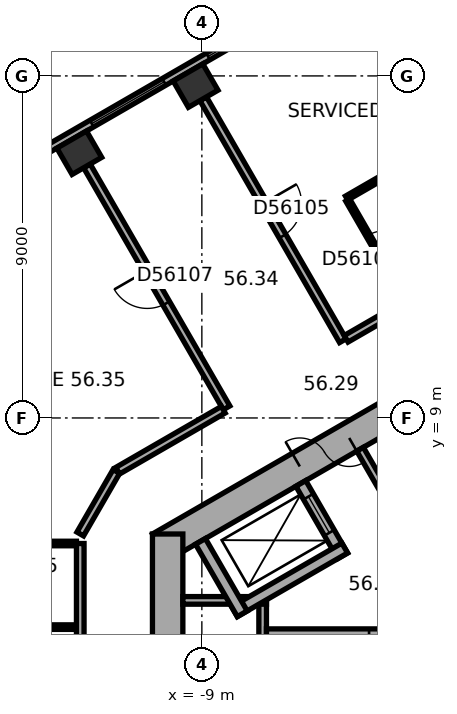
"""IFC4 building model, lengths in metres.
Left out: names, types, materials, properties, quantities, classifications, styles, units other than length and angle.
Written with IfcOpenShell. Run it as: python <this file> out.ifc"""

import sys

from ifc_helpers import new_model, si_unit, direction, frame, frame_2d, origin, origin_2d, place, context, subcontext, project, spatial, rectangle, extrude, element, fill, save


model = new_model("IFC4")
c1 = context("Model", 3, precision=1e-05, world=origin(), true_north=direction((0.0, 1.0)))
c2 = subcontext(c1, "Body", "Model", "MODEL_VIEW")
j1 = project(units=[si_unit("LENGTHUNIT", "METRE"), si_unit("PLANEANGLEUNIT", "RADIAN")], contexts=[c1])
p1 = place(None, origin())
s1 = spatial("IfcSite", under=j1, at=p1, CompositionType="ELEMENT")
p2 = place(p1, origin())
s2 = spatial("IfcBuilding", under=s1, at=p2, CompositionType="ELEMENT")
p3 = place(p2, frame((0.0, 0.0, 229.1)))
s3 = spatial("IfcBuildingStorey", under=s2, at=p3, CompositionType="ELEMENT", Elevation=229.1)
for number, where, z_axis, x_axis in (
    (1, (-9.165, 17.745, 0.0), (0.0, 0.0, 1.0), (-0.866, -0.5, 0.0)),
    (2, (-12.225, 15.978, 0.0), (0.0, 0.0, 1.0), (-0.866, -0.5, 0.0)),
):
    element("IfcColumn", number, at=place(p3, frame(where, z_axis=z_axis, x_axis=x_axis)), inside=s3, PredefinedType="COLUMN", context=c2, shape_type="SweptSolid", body=[
        extrude(rectangle(XDim=0.9, YDim=0.8, at=origin_2d()), origin(), (0.0, 0.0, 1.0), 3.7),
    ])
p4 = place(p3, frame((0.2, 11.547, 0.0), z_axis=(0.0, 0.0, 1.0), x_axis=(-0.866023897231, -0.500002609418, 0.0)))
e3 = element("IfcWall", 3, at=p4, inside=s3, PredefinedType="SHEAR", context=c2, shape_type="SweptSolid", body=[
    extrude(rectangle(XDim=11.894, YDim=0.8, at=frame_2d((5.947, 0.0))), origin(), (0.0, 0.0, 1.0), 3.7),
])
p5 = place(p4, frame((6.147, 0.0, 0.0)))
e4 = element("IfcOpeningElement", 4, at=p5, cuts=e3, PredefinedType="OPENING", context=c2, shape_type="SweptSolid", body=[
    extrude(rectangle(XDim=1.5, YDim=2.1, at=frame_2d((0.75, 1.05))), frame((0.0, 0.41, 0.0), z_axis=(0.0, -1.0, 0.0), x_axis=(1.0, 0.0, 0.0)), (0.0, 0.0, 1.0), 0.82),
])
p6 = place(p4, frame((2.997, 0.0, 0.0)))
e5 = element("IfcOpeningElement", 5, at=p6, cuts=e3, PredefinedType="OPENING", context=c2, shape_type="SweptSolid", body=[
    extrude(rectangle(XDim=0.9, YDim=2.1, at=frame_2d((0.45, 1.05))), frame((0.0, 0.41, 0.0), z_axis=(0.0, -1.0, 0.0), x_axis=(1.0, 0.0, 0.0)), (0.0, 0.0, 1.0), 0.82),
])
p7 = place(p3, frame((-9.9, 5.947, 0.0), z_axis=(0.0, 0.0, 1.0), x_axis=(0.0, -1.0, 0.0)))
e6 = element("IfcWall", 6, at=p7, inside=s3, PredefinedType="SHEAR", context=c2, shape_type="SweptSolid", body=[
    extrude(rectangle(XDim=11.894, YDim=0.8, at=frame_2d((5.947, 0.0))), origin(), (0.0, 0.0, 1.0), 3.7),
])
p8 = place(p7, frame((5.097, 0.0, 0.0)))
e7 = element("IfcOpeningElement", 7, at=p8, cuts=e6, PredefinedType="OPENING", context=c2, shape_type="SweptSolid", body=[
    extrude(rectangle(XDim=1.1, YDim=2.1, at=frame_2d((0.55, 1.05))), frame((0.0, 0.41, 0.0), z_axis=(0.0, -1.0, 0.0), x_axis=(1.0, 0.0, 0.0)), (0.0, 0.0, 1.0), 0.82),
])
p9 = place(p7, frame((7.697, 0.0, 0.0)))
e8 = element("IfcOpeningElement", 8, at=p9, cuts=e6, PredefinedType="OPENING", context=c2, shape_type="SweptSolid", body=[
    extrude(rectangle(XDim=1.1, YDim=2.1, at=frame_2d((0.55, 1.05))), frame((0.0, 0.41, 0.0), z_axis=(0.0, -1.0, 0.0), x_axis=(1.0, 0.0, 0.0)), (0.0, 0.0, 1.0), 0.82),
])
p10 = place(p3, frame((-2.786, 22.005, 0.0), z_axis=(0.0, 0.0, 1.0), x_axis=(-0.866026555358, -0.49999800541, 0.0)))
e9 = element("IfcWall", 9, at=p10, inside=s3, PredefinedType="STANDARD", context=c2, shape_type="SweptSolid", body=[
    extrude(rectangle(XDim=18.841, YDim=0.2, at=frame_2d((9.421, 0.0))), origin(), (0.0, 0.0, 1.0), 3.7),
])
p11 = place(p10, frame((1.254, 0.0, 0.9)))
e10 = element("IfcOpeningElement", 10, at=p11, cuts=e9, PredefinedType="OPENING", context=c2, shape_type="SweptSolid", body=[
    extrude(rectangle(XDim=2.2, YDim=2.0, at=frame_2d((1.1, 1.0))), frame((0.0, 0.11, 0.0), z_axis=(0.0, -1.0, 0.0), x_axis=(1.0, 0.0, 0.0)), (0.0, 0.0, 1.0), 0.22),
])
p12 = place(p10, frame((4.788, 0.0, 0.9)))
e11 = element("IfcOpeningElement", 11, at=p12, cuts=e9, PredefinedType="OPENING", context=c2, shape_type="SweptSolid", body=[
    extrude(rectangle(XDim=2.2, YDim=2.0, at=frame_2d((1.1, 1.0))), frame((0.0, 0.11, 0.0), z_axis=(0.0, -1.0, 0.0), x_axis=(1.0, 0.0, 0.0)), (0.0, 0.0, 1.0), 0.22),
])
p13 = place(p10, frame((8.321, 0.0, 0.9)))
e12 = element("IfcOpeningElement", 12, at=p13, cuts=e9, PredefinedType="OPENING", context=c2, shape_type="SweptSolid", body=[
    extrude(rectangle(XDim=2.2, YDim=2.0, at=frame_2d((1.1, 1.0))), frame((0.0, 0.11, 0.0), z_axis=(0.0, -1.0, 0.0), x_axis=(1.0, 0.0, 0.0)), (0.0, 0.0, 1.0), 0.22),
])
p14 = place(p10, frame((11.855, 0.0, 0.9)))
e13 = element("IfcOpeningElement", 13, at=p14, cuts=e9, PredefinedType="OPENING", context=c2, shape_type="SweptSolid", body=[
    extrude(rectangle(XDim=2.2, YDim=2.0, at=frame_2d((1.1, 1.0))), frame((0.0, 0.11, 0.0), z_axis=(0.0, -1.0, 0.0), x_axis=(1.0, 0.0, 0.0)), (0.0, 0.0, 1.0), 0.22),
])
p15 = place(p10, frame((15.389, 0.0, 0.9)))
e14 = element("IfcOpeningElement", 14, at=p15, cuts=e9, PredefinedType="OPENING", context=c2, shape_type="SweptSolid", body=[
    extrude(rectangle(XDim=2.2, YDim=2.0, at=frame_2d((1.1, 1.0))), frame((0.0, 0.11, 0.0), z_axis=(0.0, -1.0, 0.0), x_axis=(1.0, 0.0, 0.0)), (0.0, 0.0, 1.0), 0.22),
])
p16 = place(p3, frame((-3.737, 6.272, 0.0), z_axis=(0.0, 0.0, 1.0), x_axis=(-0.50002983664, 0.866008176907, 0.0)))
e15 = element("IfcWall", 15, at=p16, inside=s3, PredefinedType="PARTITIONING", context=c2, shape_type="SweptSolid", body=[
    extrude(rectangle(XDim=2.2, YDim=0.2, at=frame_2d((1.1, 0.0))), origin(), (0.0, 0.0, 1.0), 3.42),
])
p17 = place(p3, frame((-7.4, 4.3, 0.0), z_axis=(0.0, 0.0, 1.0), x_axis=(0.0, -1.0, 0.0)))
e16 = element("IfcWall", 16, at=p17, inside=s3, PredefinedType="PARTITIONING", context=c2, shape_type="SweptSolid", body=[
    extrude(rectangle(XDim=8.0, YDim=0.2, at=frame_2d((4.0, 0.0))), origin(), (0.0, 0.0, 1.0), 3.42),
])
p18 = place(p3, frame((-7.3, 4.2, 0.0), z_axis=(0.0, 0.0, 1.0), x_axis=(-1.0, 0.0, 0.0)))
e17 = element("IfcWall", 17, at=p18, inside=s3, PredefinedType="PARTITIONING", context=c2, shape_type="SweptSolid", body=[
    extrude(rectangle(XDim=2.2, YDim=0.2, at=frame_2d((1.1, 0.0))), origin(), (0.0, 0.0, 1.0), 3.42),
])
p19 = place(p3, frame((-2.6, 3.3, 0.0), z_axis=(0.0, 0.0, 1.0), x_axis=(-1.0, 0.0, 0.0)))
e18 = element("IfcWall", 18, at=p19, inside=s3, PredefinedType="SHEAR", context=c2, shape_type="SweptSolid", body=[
    extrude(rectangle(XDim=4.7, YDim=0.3, at=frame_2d((2.35, 0.0))), origin(), (0.0, 0.0, 1.0), 3.42),
])
p20 = place(p19, frame((0.8, 0.0, 0.0)))
e19 = element("IfcOpeningElement", 19, at=p20, cuts=e18, PredefinedType="OPENING", context=c2, shape_type="SweptSolid", body=[
    extrude(rectangle(XDim=1.2, YDim=2.1, at=frame_2d((0.6, 1.05))), frame((0.0, 0.16, 0.0), z_axis=(0.0, -1.0, 0.0), x_axis=(1.0, 0.0, 0.0)), (0.0, 0.0, 1.0), 0.32),
])
p21 = place(p3, frame((-5.295, 5.372, 0.0), z_axis=(0.0, 0.0, 1.0), x_axis=(-0.500077893725, 0.86598042715, 0.0)))
e20 = element("IfcWall", 20, at=p21, inside=s3, PredefinedType="SHEAR", context=c2, shape_type="SweptSolid", body=[
    extrude(rectangle(XDim=2.2, YDim=0.3, at=frame_2d((1.1, 0.0))), origin(), (0.0, 0.0, 1.0), 3.42),
])
p22 = place(p21, frame((0.7, 0.0, 0.0)))
e21 = element("IfcOpeningElement", 21, at=p22, cuts=e20, PredefinedType="OPENING", context=c2, shape_type="SweptSolid", body=[
    extrude(rectangle(XDim=1.1, YDim=2.1, at=frame_2d((0.55, 1.05))), frame((0.0, 0.16, 0.0), z_axis=(0.0, -1.0, 0.0), x_axis=(1.0, 0.0, 0.0)), (0.0, 0.0, 1.0), 0.32),
])
p23 = place(p3, frame((-5.24, 5.577, 0.0), z_axis=(0.0, 0.0, 1.0), x_axis=(-0.866014461049, -0.500018952895, 0.0)))
e22 = element("IfcWall", 22, at=p23, inside=s3, PredefinedType="SHEAR", context=c2, shape_type="SweptSolid", body=[
    extrude(rectangle(XDim=3.35, YDim=0.3, at=frame_2d((1.675, 0.0))), origin(), (0.0, 0.0, 1.0), 3.42),
])
p24 = place(p3, frame((-7.937, 3.847, 0.0), z_axis=(0.0, 0.0, 1.0), x_axis=(-0.50002983664, 0.866008176907, 0.0)))
e23 = element("IfcWall", 23, at=p24, inside=s3, PredefinedType="SHEAR", context=c2, shape_type="SweptSolid", body=[
    extrude(rectangle(XDim=2.2, YDim=0.3, at=frame_2d((1.1, 0.0))), origin(), (0.0, 0.0, 1.0), 3.42),
])
p25 = place(p3, frame((-14.74, 5.697, 0.0), z_axis=(0.0, 0.0, 1.0), x_axis=(1.0, 0.0, 0.0)))
e24 = element("IfcWall", 24, at=p25, inside=s3, PredefinedType="PARTITIONING", context=c2, shape_type="SweptSolid", body=[
    extrude(rectangle(XDim=2.44, YDim=0.12, at=frame_2d((1.22, 0.0))), origin(), (0.0, 0.0, 1.0), 3.42),
])
p26 = place(p3, frame((-12.3, 3.497, 0.0), z_axis=(0.0, 0.0, 1.0), x_axis=(-1.0, 0.0, 0.0)))
e25 = element("IfcWall", 25, at=p26, inside=s3, PredefinedType="PARTITIONING", context=c2, shape_type="SweptSolid", body=[
    extrude(rectangle(XDim=2.44, YDim=0.12, at=frame_2d((1.22, 0.0))), origin(), (0.0, 0.0, 1.0), 3.42),
])
p27 = place(p26, frame((0.77, 0.0, 0.0)))
e26 = element("IfcOpeningElement", 26, at=p27, cuts=e25, PredefinedType="OPENING", context=c2, shape_type="SweptSolid", body=[
    extrude(rectangle(XDim=0.9, YDim=2.1, at=frame_2d((0.45, 1.05))), frame((0.0, 0.07, 0.0), z_axis=(0.0, -1.0, 0.0), x_axis=(1.0, 0.0, 0.0)), (0.0, 0.0, 1.0), 0.14),
])
p28 = place(p3, frame((-12.2, 5.697, 0.0), z_axis=(0.0, 0.0, 1.0), x_axis=(0.0, -1.0, 0.0)))
e27 = element("IfcWall", 27, at=p28, inside=s3, PredefinedType="PARTITIONING", context=c2, shape_type="SweptSolid", body=[
    extrude(rectangle(XDim=3.496, YDim=0.2, at=frame_2d((1.748, 0.0))), origin(), (0.0, 0.0, 1.0), 3.42),
])
p29 = place(p3, frame((-12.025, 15.632, 0.0), z_axis=(0.0, 0.0, 1.0), x_axis=(0.499983153418, -0.866035129944, 0.0)))
e28 = element("IfcWall", 28, at=p29, inside=s3, PredefinedType="PARTITIONING", context=c2, shape_type="SweptSolid", body=[
    extrude(rectangle(XDim=7.35, YDim=0.2, at=frame_2d((3.675, 0.0))), origin(), (0.0, 0.0, 1.0), 3.42),
])
p30 = place(p29, frame((3.175, 0.0, 0.0)))
e29 = element("IfcOpeningElement", 29, at=p30, cuts=e28, PredefinedType="OPENING", context=c2, shape_type="SweptSolid", body=[
    extrude(rectangle(XDim=1.0, YDim=2.1, at=frame_2d((0.5, 1.05))), frame((0.0, 0.11, 0.0), z_axis=(0.0, -1.0, 0.0), x_axis=(1.0, 0.0, 0.0)), (0.0, 0.0, 1.0), 0.22),
])
p31 = place(p3, frame((-11.25, 7.592, 0.0), z_axis=(0.0, 0.0, 1.0), x_axis=(-0.500022797313, -0.86601224135, 0.0)))
e30 = element("IfcWall", 30, at=p31, inside=s3, PredefinedType="PARTITIONING", context=c2, shape_type="SweptSolid", body=[
    extrude(rectangle(XDim=1.9, YDim=0.2, at=frame_2d((0.95, 0.0))), origin(), (0.0, 0.0, 1.0), 3.42),
])
p32 = place(p3, frame((-8.965, 17.399, 0.0), z_axis=(0.0, 0.0, 1.0), x_axis=(0.499993683172, -0.866029050776, 0.0)))
e31 = element("IfcWall", 31, at=p32, inside=s3, PredefinedType="PARTITIONING", context=c2, shape_type="SweptSolid", body=[
    extrude(rectangle(XDim=7.35, YDim=0.2, at=frame_2d((3.675, 0.0))), origin(), (0.0, 0.0, 1.0), 2.87),
])
p33 = place(p32, frame((3.175, 0.0, 0.0)))
e32 = element("IfcOpeningElement", 32, at=p33, cuts=e31, PredefinedType="OPENING", context=c2, shape_type="SweptSolid", body=[
    extrude(rectangle(XDim=1.0, YDim=2.1, at=frame_2d((0.5, 1.05))), frame((0.0, 0.11, 0.0), z_axis=(0.0, -1.0, 0.0), x_axis=(1.0, 0.0, 0.0)), (0.0, 0.0, 1.0), 0.22),
])
p34 = place(p3, frame((-8.437, 9.217, 0.0), z_axis=(0.0, 0.0, 1.0), x_axis=(-0.866005660673, -0.500034194513, 0.0)))
e33 = element("IfcWall", 33, at=p34, inside=s3, PredefinedType="PARTITIONING", context=c2, shape_type="SweptSolid", body=[
    extrude(rectangle(XDim=3.209, YDim=0.2, at=frame_2d((1.604, 0.0))), origin(), (0.0, 0.0, 1.0), 3.42),
])
p35 = place(p3, frame((-5.191, 14.785, 0.0), z_axis=(0.0, 0.0, 1.0), x_axis=(0.866034573852, 0.49998411664, 0.0)))
e34 = element("IfcWall", 34, at=p35, inside=s3, PredefinedType="PARTITIONING", context=c2, shape_type="SweptSolid", body=[
    extrude(rectangle(XDim=2.8, YDim=0.12, at=frame_2d((1.4, 0.0))), origin(), (0.0, 0.0, 1.0), 3.42),
])
p36 = place(p3, frame((-3.641, 12.101, 0.0), z_axis=(0.0, 0.0, 1.0), x_axis=(-0.500026023896, 0.86601037836, 0.0)))
e35 = element("IfcWall", 35, at=p36, inside=s3, PredefinedType="PARTITIONING", context=c2, shape_type="SweptSolid", body=[
    extrude(rectangle(XDim=3.04, YDim=0.12, at=frame_2d((1.52, 0.0))), origin(), (0.0, 0.0, 1.0), 3.42),
])
p37 = place(p36, frame((1.07, 0.0, 0.0)))
e36 = element("IfcOpeningElement", 36, at=p37, cuts=e35, PredefinedType="OPENING", context=c2, shape_type="SweptSolid", body=[
    extrude(rectangle(XDim=0.9, YDim=2.1, at=frame_2d((0.45, 1.05))), frame((0.0, 0.07, 0.0), z_axis=(0.0, -1.0, 0.0), x_axis=(1.0, 0.0, 0.0)), (0.0, 0.0, 1.0), 0.14),
])
p38 = place(p3, frame((-1.167, 13.414, 0.0), z_axis=(0.0, 0.0, 1.0), x_axis=(-0.866023347809, -0.500003561037, 0.0)))
e37 = element("IfcWall", 37, at=p38, inside=s3, PredefinedType="PARTITIONING", context=c2, shape_type="SweptSolid", body=[
    extrude(rectangle(XDim=4.661, YDim=0.2, at=frame_2d((2.331, 0.0))), origin(), (0.0, 0.0, 1.0), 3.42),
])
p39 = place(p12, origin())
e38 = element("IfcWindow", 38, at=p39, inside=s3, PartitioningType="SINGLE_PANEL", PredefinedType="WINDOW", context=c2, shape_type="SweptSolid", body=[
    extrude(rectangle(XDim=2.2, YDim=2.0, at=frame_2d((1.1, 1.0))), frame((0.0, 0.03, 0.0), z_axis=(0.0, -1.0, 0.0), x_axis=(1.0, 0.0, 0.0)), (0.0, 0.0, 1.0), 0.06),
])
fill(e11, e38)
p40 = place(p13, origin())
e39 = element("IfcWindow", 39, at=p40, inside=s3, PartitioningType="SINGLE_PANEL", PredefinedType="WINDOW", context=c2, shape_type="SweptSolid", body=[
    extrude(rectangle(XDim=2.2, YDim=2.0, at=frame_2d((1.1, 1.0))), frame((0.0, 0.03, 0.0), z_axis=(0.0, -1.0, 0.0), x_axis=(1.0, 0.0, 0.0)), (0.0, 0.0, 1.0), 0.06),
])
fill(e12, e39)
p41 = place(p5, origin())
e40 = element("IfcDoor", 40, at=p41, inside=s3, OperationType="DOUBLE_DOOR_SINGLE_SWING", PredefinedType="DOOR", context=c2, shape_type="SweptSolid", body=[
    extrude(rectangle(XDim=1.5, YDim=2.1, at=frame_2d((0.75, 1.05))), frame((0.0, 0.025, 0.0), z_axis=(0.0, -1.0, 0.0), x_axis=(1.0, 0.0, 0.0)), (0.0, 0.0, 1.0), 0.05),
])
fill(e4, e40)
p42 = place(p20, origin())
e41 = element("IfcDoor", 41, at=p42, inside=s3, OperationType="SINGLE_SWING_RIGHT", PredefinedType="DOOR", context=c2, shape_type="SweptSolid", body=[
    extrude(rectangle(XDim=1.2, YDim=2.1, at=frame_2d((0.6, 1.05))), frame((0.0, 0.025, 0.0), z_axis=(0.0, -1.0, 0.0), x_axis=(1.0, 0.0, 0.0)), (0.0, 0.0, 1.0), 0.05),
])
fill(e19, e41)
p43 = place(p22, origin())
e42 = element("IfcDoor", 42, at=p43, inside=s3, OperationType="DOUBLE_DOOR_SLIDING", PredefinedType="DOOR", context=c2, shape_type="SweptSolid", body=[
    extrude(rectangle(XDim=1.1, YDim=2.1, at=frame_2d((0.55, 1.05))), frame((0.0, 0.025, 0.0), z_axis=(0.0, -1.0, 0.0), x_axis=(1.0, 0.0, 0.0)), (0.0, 0.0, 1.0), 0.05),
])
fill(e21, e42)
p44 = place(p33, origin())
e43 = element("IfcDoor", 43, at=p44, inside=s3, OperationType="SINGLE_SWING_LEFT", PredefinedType="DOOR", context=c2, shape_type="SweptSolid", body=[
    extrude(rectangle(XDim=1.0, YDim=2.1, at=frame_2d((0.5, 1.05))), frame((0.0, 0.025, 0.0), z_axis=(0.0, -1.0, 0.0), x_axis=(1.0, 0.0, 0.0)), (0.0, 0.0, 1.0), 0.05),
])
fill(e32, e43)
p45 = place(p37, origin())
e44 = element("IfcDoor", 44, at=p45, inside=s3, OperationType="SINGLE_SWING_LEFT", PredefinedType="DOOR", context=c2, shape_type="SweptSolid", body=[
    extrude(rectangle(XDim=0.9, YDim=2.1, at=frame_2d((0.45, 1.05))), frame((0.0, 0.025, 0.0), z_axis=(0.0, -1.0, 0.0), x_axis=(1.0, 0.0, 0.0)), (0.0, 0.0, 1.0), 0.05),
])
fill(e36, e44)
p46 = place(p30, origin())
e45 = element("IfcDoor", 45, at=p46, inside=s3, OperationType="SINGLE_SWING_LEFT", PredefinedType="DOOR", context=c2, shape_type="SweptSolid", body=[
    extrude(rectangle(XDim=1.0, YDim=2.1, at=frame_2d((0.5, 1.05))), frame((0.0, 0.025, 0.0), z_axis=(0.0, -1.0, 0.0), x_axis=(1.0, 0.0, 0.0)), (0.0, 0.0, 1.0), 0.05),
])
fill(e29, e45)
save(model, sys.argv[1])
